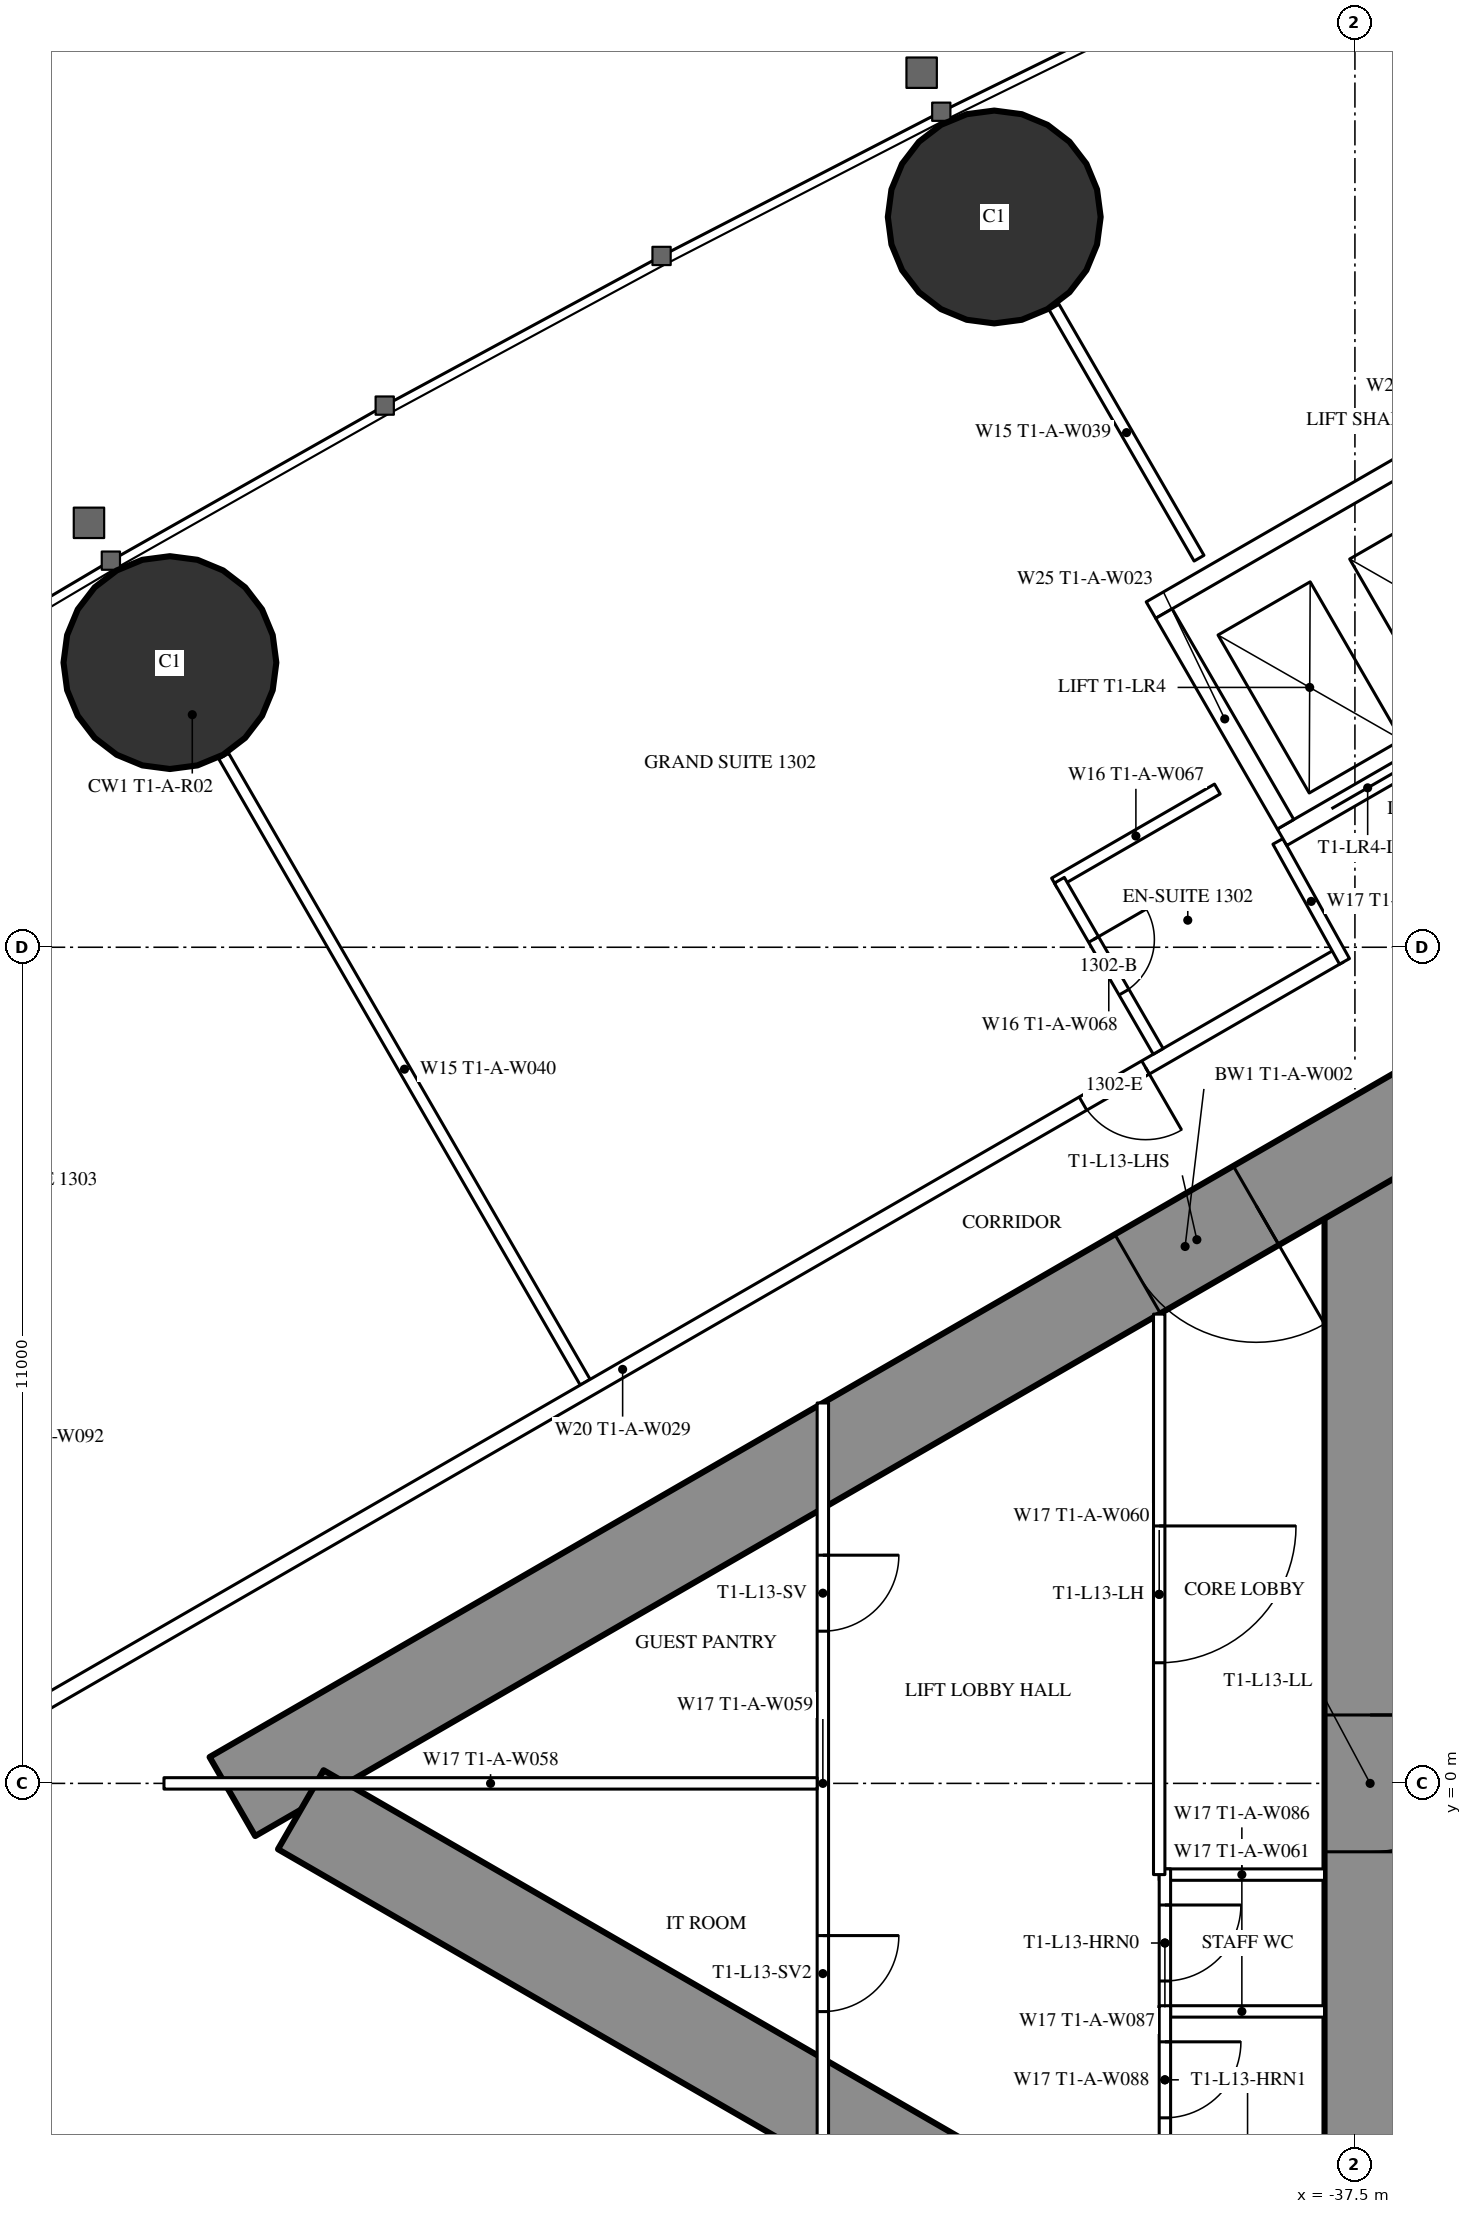
"""IFC4 building model, lengths in metres.
Left out: names, types, materials, properties, quantities, classifications, styles, units other than length and angle.
Written with IfcOpenShell. Run it as: python <this file> out.ifc"""

import sys

from ifc_helpers import new_model, si_unit, direction, frame, frame_2d, origin, origin_2d, place, context, subcontext, project, spatial, rectangle, hollow_circle, extrude, element, fill, save


model = new_model("IFC4")
c1 = context("Model", 3, precision=1e-05, world=origin(), true_north=direction((0.0, 1.0)))
c2 = subcontext(c1, "Body", "Model", "MODEL_VIEW")
j1 = project(units=[si_unit("LENGTHUNIT", "METRE"), si_unit("PLANEANGLEUNIT", "RADIAN")], contexts=[c1])
p1 = place(None, origin())
s1 = spatial("IfcSite", under=j1, at=p1, CompositionType="ELEMENT")
p2 = place(p1, origin())
s2 = spatial("IfcBuilding", under=s1, at=p2, CompositionType="ELEMENT")
p3 = place(p2, frame((0.0, 0.0, 53.0)))
s3 = spatial("IfcBuildingStorey", under=s2, at=p3, CompositionType="ELEMENT", Elevation=53.0)
for number, where, z_axis, x_axis in (
    (1, (-42.245, 20.607, 0.0), (0.0, 0.0, 1.0), (1.0, 0.0, 0.0)),
    (2, (-53.09, 14.745, 0.0), (0.0, 0.0, 1.0), (1.0, 0.0, 0.0)),
):
    element("IfcColumn", number, at=place(p3, frame(where, z_axis=z_axis, x_axis=x_axis)), inside=s3, PredefinedType="COLUMN", context=c2, shape_type="SweptSolid", body=[
        extrude(hollow_circle(Radius=1.4, WallThickness=0.12, at=origin_2d()), origin(), (0.0, 0.0, 1.0), 3.5),
    ])
p4 = place(p3, frame((-37.3, 8.6, 0.0), z_axis=(0.0, 0.0, 1.0), x_axis=(0.0, -1.0, 0.0)))
e3 = element("IfcWall", 3, at=p4, inside=s3, PredefinedType="SHEAR", context=c2, shape_type="SweptSolid", body=[
    extrude(rectangle(XDim=17.2, YDim=1.2, at=frame_2d((8.6, 0.0))), origin(), (0.0, 0.0, 1.0), 3.5),
])
p5 = place(p4, frame((7.7, 0.0, 0.0)))
e4 = element("IfcOpeningElement", 4, at=p5, cuts=e3, PredefinedType="OPENING", context=c2, shape_type="SweptSolid", body=[
    extrude(rectangle(XDim=1.8, YDim=2.2, at=frame_2d((0.9, 1.1))), frame((0.0, 0.61, 0.0), z_axis=(0.0, -1.0, 0.0), x_axis=(1.0, 0.0, 0.0)), (0.0, 0.0, 1.0), 1.22),
])
p6 = place(p3, frame((-27.2, 14.3, 0.0), z_axis=(0.0, 0.0, 1.0), x_axis=(-0.866026593062, -0.499997940104, 0.0)))
e5 = element("IfcWall", 5, at=p6, inside=s3, PredefinedType="SHEAR", context=c2, shape_type="SweptSolid", body=[
    extrude(rectangle(XDim=28.946, YDim=1.2, at=frame_2d((14.473, 0.0))), origin(), (0.0, 0.0, 1.0), 3.5),
])
p7 = place(p6, frame((4.6, 0.0, 0.0)))
e6 = element("IfcOpeningElement", 6, at=p7, cuts=e5, PredefinedType="OPENING", context=c2, shape_type="SweptSolid", body=[
    extrude(rectangle(XDim=1.0, YDim=2.2, at=frame_2d((0.5, 1.1))), frame((0.0, 0.61, 0.0), z_axis=(0.0, -1.0, 0.0), x_axis=(1.0, 0.0, 0.0)), (0.0, 0.0, 1.0), 1.22),
])
p8 = place(p6, frame((13.395, 0.0, 0.0)))
e7 = element("IfcOpeningElement", 7, at=p8, cuts=e5, PredefinedType="OPENING", context=c2, shape_type="SweptSolid", body=[
    extrude(rectangle(XDim=1.8, YDim=2.2, at=frame_2d((0.9, 1.1))), frame((0.0, 0.61, 0.0), z_axis=(0.0, -1.0, 0.0), x_axis=(1.0, 0.0, 0.0)), (0.0, 0.0, 1.0), 1.22),
])
p9 = place(p3, frame((-27.2, -14.3, 0.0), z_axis=(0.0, 0.0, 1.0), x_axis=(-0.866024021859, 0.500002393557, 0.0)))
e8 = element("IfcWall", 8, at=p9, inside=s3, PredefinedType="SHEAR", context=c2, shape_type="SweptSolid", body=[
    extrude(rectangle(XDim=27.907, YDim=1.2, at=frame_2d((13.954, 0.0))), origin(), (0.0, 0.0, 1.0), 3.5),
])
p10 = place(p9, frame((4.6, 0.0, 0.0)))
e9 = element("IfcOpeningElement", 9, at=p10, cuts=e8, PredefinedType="OPENING", context=c2, shape_type="SweptSolid", body=[
    extrude(rectangle(XDim=1.0, YDim=2.2, at=frame_2d((0.5, 1.1))), frame((0.0, 0.61, 0.0), z_axis=(0.0, -1.0, 0.0), x_axis=(1.0, 0.0, 0.0)), (0.0, 0.0, 1.0), 1.22),
])
p11 = place(p9, frame((13.395, 0.0, 0.0)))
e10 = element("IfcOpeningElement", 10, at=p11, cuts=e8, PredefinedType="OPENING", context=c2, shape_type="SweptSolid", body=[
    extrude(rectangle(XDim=1.8, YDim=2.2, at=frame_2d((0.9, 1.1))), frame((0.0, 0.61, 0.0), z_axis=(0.0, -1.0, 0.0), x_axis=(1.0, 0.0, 0.0)), (0.0, 0.0, 1.0), 1.22),
])
p12 = place(p3, frame((-47.627, 5.278, 0.0), z_axis=(0.0, 0.0, 1.0), x_axis=(-0.500009844318, 0.86601972009, 0.0)))
e11 = element("IfcWall", 11, at=p12, inside=s3, PredefinedType="PARTITIONING", context=c2, shape_type="SweptSolid", body=[
    extrude(rectangle(XDim=9.51, YDim=0.15, at=frame_2d((4.755, 0.0))), origin(), (0.0, 0.0, 1.0), 2.25),
])
p13 = place(p3, frame((-39.551, 16.119, 0.0), z_axis=(0.0, 0.0, 1.0), x_axis=(-0.500014214979, 0.866017196607, 0.0)))
e12 = element("IfcWall", 12, at=p13, inside=s3, PredefinedType="PARTITIONING", context=c2, shape_type="SweptSolid", body=[
    extrude(rectangle(XDim=3.815, YDim=0.15, at=frame_2d((1.907, 0.0))), origin(), (0.0, 0.0, 1.0), 3.25),
])
p14 = place(p3, frame((-37.7, 10.894, 0.0), z_axis=(0.0, 0.0, 1.0), x_axis=(-0.866027905338, -0.499995667157, 0.0)))
e13 = element("IfcWall", 13, at=p14, inside=s3, PredefinedType="PARTITIONING", context=c2, shape_type="SweptSolid", body=[
    extrude(rectangle(XDim=21.787, YDim=0.2, at=frame_2d((10.894, 0.0))), origin(), (0.0, 0.0, 1.0), 3.25),
])
p15 = place(p14, frame((20.237, 0.0, 0.0)))
e14 = element("IfcOpeningElement", 14, at=p15, cuts=e13, PredefinedType="OPENING", context=c2, shape_type="SweptSolid", body=[
    extrude(rectangle(XDim=0.95, YDim=2.2, at=frame_2d((0.475, 1.1))), frame((0.0, 0.11, 0.0), z_axis=(0.0, -1.0, 0.0), x_axis=(1.0, 0.0, 0.0)), (0.0, 0.0, 1.0), 0.22),
])
p16 = place(p14, frame((2.95, 0.0, 0.0)))
e15 = element("IfcOpeningElement", 15, at=p16, cuts=e13, PredefinedType="OPENING", context=c2, shape_type="SweptSolid", body=[
    extrude(rectangle(XDim=0.95, YDim=2.2, at=frame_2d((0.475, 1.1))), frame((0.0, 0.11, 0.0), z_axis=(0.0, -1.0, 0.0), x_axis=(1.0, 0.0, 0.0)), (0.0, 0.0, 1.0), 0.22),
])
p17 = place(p3, frame((-38.513, 12.392, 0.0), z_axis=(0.0, 0.0, 1.0), x_axis=(0.485585508183, -0.874189175317, 0.0)))
e16 = element("IfcWall", 16, at=p17, inside=s3, PredefinedType="PARTITIONING", context=c2, shape_type="SweptSolid", body=[
    extrude(rectangle(XDim=1.805, YDim=0.15, at=frame_2d((0.902, 0.0))), origin(), (0.0, 0.0, 1.0), 3.25),
])
p18 = place(p3, frame((-39.31, 13.082, 0.0), z_axis=(0.0, 0.0, 1.0), x_axis=(-0.866031185235, -0.4999899861, 0.0)))
e17 = element("IfcWall", 17, at=p18, inside=s3, PredefinedType="PARTITIONING", context=c2, shape_type="SweptSolid", body=[
    extrude(rectangle(XDim=2.475, YDim=0.15, at=frame_2d((1.238, 0.0))), origin(), (0.0, 0.0, 1.0), 3.25),
])
p19 = place(p3, frame((-40.088, 9.63, 0.0), z_axis=(0.0, 0.0, 1.0), x_axis=(-0.500006934395, 0.866021400173, 0.0)))
e18 = element("IfcWall", 18, at=p19, inside=s3, PredefinedType="PARTITIONING", context=c2, shape_type="SweptSolid", body=[
    extrude(rectangle(XDim=2.6, YDim=0.15, at=frame_2d((1.3, 0.0))), origin(), (0.0, 0.0, 1.0), 3.25),
])
p20 = place(p19, frame((0.9, 0.0, 0.0)))
e19 = element("IfcOpeningElement", 19, at=p20, cuts=e18, PredefinedType="OPENING", context=c2, shape_type="SweptSolid", body=[
    extrude(rectangle(XDim=0.8, YDim=2.2, at=frame_2d((0.4, 1.1))), frame((0.0, 0.085, 0.0), z_axis=(0.0, -1.0, 0.0), x_axis=(1.0, 0.0, 0.0)), (0.0, 0.0, 1.0), 0.17),
])
for number, where, z_axis, x_axis in (
    (20, (-37.9, -1.2, 0.0), (0.0, 0.0, 1.0), (-1.0, 0.0, 0.0)),
    (21, (-37.9, -3.0, 0.0), (0.0, 0.0, 1.0), (-1.0, 0.0, 0.0)),
):
    element("IfcWall", number, at=place(p3, frame(where, z_axis=z_axis, x_axis=x_axis)), inside=s3, PredefinedType="PARTITIONING", context=c2, shape_type="SweptSolid", body=[
        extrude(rectangle(XDim=2.175, YDim=0.15, at=frame_2d((1.087, 0.0))), origin(), (0.0, 0.0, 1.0), 3.25),
    ])
p21 = place(p3, frame((-40.0, -1.125, 0.0), z_axis=(0.0, 0.0, 1.0), x_axis=(0.0, -1.0, 0.0)))
e22 = element("IfcWall", 22, at=p21, inside=s3, PredefinedType="PARTITIONING", context=c2, shape_type="SweptSolid", body=[
    extrude(rectangle(XDim=1.95, YDim=0.15, at=frame_2d((0.975, 0.0))), origin(), (0.0, 0.0, 1.0), 3.25),
])
p22 = place(p21, frame((0.475, 0.0, 0.0)))
e23 = element("IfcOpeningElement", 23, at=p22, cuts=e22, PredefinedType="OPENING", context=c2, shape_type="SweptSolid", body=[
    extrude(rectangle(XDim=1.0, YDim=2.2, at=frame_2d((0.5, 1.1))), frame((0.0, 0.085, 0.0), z_axis=(0.0, -1.0, 0.0), x_axis=(1.0, 0.0, 0.0)), (0.0, 0.0, 1.0), 0.17),
])
p23 = place(p3, frame((-40.0, -2.925, 0.0), z_axis=(0.0, 0.0, 1.0), x_axis=(0.0, -1.0, 0.0)))
e24 = element("IfcWall", 24, at=p23, inside=s3, PredefinedType="PARTITIONING", context=c2, shape_type="SweptSolid", body=[
    extrude(rectangle(XDim=1.95, YDim=0.15, at=frame_2d((0.975, 0.0))), origin(), (0.0, 0.0, 1.0), 3.25),
])
p24 = place(p23, frame((0.475, 0.0, 0.0)))
e25 = element("IfcOpeningElement", 25, at=p24, cuts=e24, PredefinedType="OPENING", context=c2, shape_type="SweptSolid", body=[
    extrude(rectangle(XDim=1.0, YDim=2.2, at=frame_2d((0.5, 1.1))), frame((0.0, 0.085, 0.0), z_axis=(0.0, -1.0, 0.0), x_axis=(1.0, 0.0, 0.0)), (0.0, 0.0, 1.0), 0.17),
])
p25 = place(p3, frame((-40.075, 6.174, 0.0), z_axis=(0.0, 0.0, 1.0), x_axis=(0.0, -1.0, 0.0)))
e26 = element("IfcWall", 26, at=p25, inside=s3, PredefinedType="PARTITIONING", context=c2, shape_type="SweptSolid", body=[
    extrude(rectangle(XDim=7.374, YDim=0.15, at=frame_2d((3.687, 0.0))), origin(), (0.0, 0.0, 1.0), 3.25),
])
p26 = place(p25, frame((2.787, 0.0, 0.0)))
e27 = element("IfcOpeningElement", 27, at=p26, cuts=e26, PredefinedType="OPENING", context=c2, shape_type="SweptSolid", body=[
    extrude(rectangle(XDim=1.8, YDim=2.2, at=frame_2d((0.9, 1.1))), frame((0.0, 0.085, 0.0), z_axis=(0.0, -1.0, 0.0), x_axis=(1.0, 0.0, 0.0)), (0.0, 0.0, 1.0), 0.17),
])
p27 = place(p3, frame((-44.5, 5.005, 0.0), z_axis=(0.0, 0.0, 1.0), x_axis=(0.0, -1.0, 0.0)))
e28 = element("IfcWall", 28, at=p27, inside=s3, PredefinedType="PARTITIONING", context=c2, shape_type="SweptSolid", body=[
    extrude(rectangle(XDim=10.009, YDim=0.15, at=frame_2d((5.005, 0.0))), origin(), (0.0, 0.0, 1.0), 2.45),
])
p28 = place(p27, frame((2.002, 0.0, 0.0)))
e29 = element("IfcOpeningElement", 29, at=p28, cuts=e28, PredefinedType="OPENING", context=c2, shape_type="SweptSolid", body=[
    extrude(rectangle(XDim=1.0, YDim=2.2, at=frame_2d((0.5, 1.1))), frame((0.0, 0.085, 0.0), z_axis=(0.0, -1.0, 0.0), x_axis=(1.0, 0.0, 0.0)), (0.0, 0.0, 1.0), 0.17),
])
p29 = place(p27, frame((7.007, 0.0, 0.0)))
e30 = element("IfcOpeningElement", 30, at=p29, cuts=e28, PredefinedType="OPENING", context=c2, shape_type="SweptSolid", body=[
    extrude(rectangle(XDim=1.0, YDim=2.2, at=frame_2d((0.5, 1.1))), frame((0.0, 0.085, 0.0), z_axis=(0.0, -1.0, 0.0), x_axis=(1.0, 0.0, 0.0)), (0.0, 0.0, 1.0), 0.17),
])
p30 = place(p3, frame((-44.575, 0.0, 0.0), z_axis=(0.0, 0.0, 1.0), x_axis=(-1.0, 0.0, 0.0)))
e31 = element("IfcWall", 31, at=p30, inside=s3, PredefinedType="PARTITIONING", context=c2, shape_type="SweptSolid", body=[
    extrude(rectangle(XDim=8.593, YDim=0.15, at=frame_2d((4.297, 0.0))), origin(), (0.0, 0.0, 1.0), 2.25),
])
p31 = place(p3, frame((-31.01, 16.747, 0.0), z_axis=(0.0, 0.0, 1.0), x_axis=(-0.866028165386, -0.499995216735, 0.0)))
e32 = element("IfcWall", 32, at=p31, inside=s3, PredefinedType="PARTITIONING", context=c2, shape_type="SweptSolid", body=[
    extrude(rectangle(XDim=8.6, YDim=0.25, at=frame_2d((4.3, 0.0))), origin(), (0.0, 0.0, 1.0), 3.25),
])
p32 = place(p31, frame((0.75, 0.0, 0.0)))
e33 = element("IfcOpeningElement", 33, at=p32, cuts=e32, PredefinedType="OPENING", context=c2, shape_type="SweptSolid", body=[
    extrude(rectangle(XDim=1.1, YDim=2.2, at=frame_2d((0.55, 1.1))), frame((0.0, 0.135, 0.0), z_axis=(0.0, -1.0, 0.0), x_axis=(1.0, 0.0, 0.0)), (0.0, 0.0, 1.0), 0.27),
])
p33 = place(p31, frame((2.75, 0.0, 0.0)))
e34 = element("IfcOpeningElement", 34, at=p33, cuts=e32, PredefinedType="OPENING", context=c2, shape_type="SweptSolid", body=[
    extrude(rectangle(XDim=1.1, YDim=2.2, at=frame_2d((0.55, 1.1))), frame((0.0, 0.135, 0.0), z_axis=(0.0, -1.0, 0.0), x_axis=(1.0, 0.0, 0.0)), (0.0, 0.0, 1.0), 0.27),
])
p34 = place(p31, frame((4.75, 0.0, 0.0)))
e35 = element("IfcOpeningElement", 35, at=p34, cuts=e32, PredefinedType="OPENING", context=c2, shape_type="SweptSolid", body=[
    extrude(rectangle(XDim=1.1, YDim=2.2, at=frame_2d((0.55, 1.1))), frame((0.0, 0.135, 0.0), z_axis=(0.0, -1.0, 0.0), x_axis=(1.0, 0.0, 0.0)), (0.0, 0.0, 1.0), 0.27),
])
p35 = place(p31, frame((6.75, 0.0, 0.0)))
e36 = element("IfcOpeningElement", 36, at=p35, cuts=e32, PredefinedType="OPENING", context=c2, shape_type="SweptSolid", body=[
    extrude(rectangle(XDim=1.1, YDim=2.2, at=frame_2d((0.55, 1.1))), frame((0.0, 0.135, 0.0), z_axis=(0.0, -1.0, 0.0), x_axis=(1.0, 0.0, 0.0)), (0.0, 0.0, 1.0), 0.27),
])
p36 = place(p3, frame((-32.736, 19.736, 0.0), z_axis=(0.0, 0.0, 1.0), x_axis=(-0.866028165386, -0.499995216735, 0.0)))
e37 = element("IfcWall", 37, at=p36, inside=s3, PredefinedType="PARTITIONING", context=c2, shape_type="SweptSolid", body=[
    extrude(rectangle(XDim=8.6, YDim=0.25, at=frame_2d((4.3, 0.0))), origin(), (0.0, 0.0, 1.0), 3.25),
])
p37 = place(p3, frame((-38.413, 12.618, 0.0), z_axis=(0.0, 0.0, 1.0), x_axis=(-0.499872130319, 0.866099216793, 0.0)))
e38 = element("IfcWall", 38, at=p37, inside=s3, PredefinedType="PARTITIONING", context=c2, shape_type="SweptSolid", body=[
    extrude(rectangle(XDim=3.2, YDim=0.25, at=frame_2d((1.6, 0.0))), origin(), (0.0, 0.0, 1.0), 3.25),
])
p38 = place(p20, origin())
e39 = element("IfcDoor", 39, at=p38, inside=s3, OperationType="SINGLE_SWING_RIGHT", PredefinedType="DOOR", context=c2, shape_type="SweptSolid", body=[
    extrude(rectangle(XDim=0.8, YDim=2.2, at=frame_2d((0.4, 1.1))), frame((0.0, 0.025, 0.0), z_axis=(0.0, -1.0, 0.0), x_axis=(1.0, 0.0, 0.0)), (0.0, 0.0, 1.0), 0.05),
])
fill(e19, e39)
p39 = place(p16, origin())
e40 = element("IfcDoor", 40, at=p39, inside=s3, OperationType="SINGLE_SWING_LEFT", PredefinedType="DOOR", context=c2, shape_type="SweptSolid", body=[
    extrude(rectangle(XDim=0.95, YDim=2.2, at=frame_2d((0.475, 1.1))), frame((0.0, 0.025, 0.0), z_axis=(0.0, -1.0, 0.0), x_axis=(1.0, 0.0, 0.0)), (0.0, 0.0, 1.0), 0.05),
])
fill(e15, e40)
p40 = place(p22, origin())
e41 = element("IfcDoor", 41, at=p40, inside=s3, OperationType="SINGLE_SWING_LEFT", PredefinedType="DOOR", context=c2, shape_type="SweptSolid", body=[
    extrude(rectangle(XDim=1.0, YDim=2.2, at=frame_2d((0.5, 1.1))), frame((0.0, 0.025, 0.0), z_axis=(0.0, -1.0, 0.0), x_axis=(1.0, 0.0, 0.0)), (0.0, 0.0, 1.0), 0.05),
])
fill(e23, e41)
p41 = place(p24, origin())
e42 = element("IfcDoor", 42, at=p41, inside=s3, OperationType="SINGLE_SWING_LEFT", PredefinedType="DOOR", context=c2, shape_type="SweptSolid", body=[
    extrude(rectangle(XDim=1.0, YDim=2.2, at=frame_2d((0.5, 1.1))), frame((0.0, 0.025, 0.0), z_axis=(0.0, -1.0, 0.0), x_axis=(1.0, 0.0, 0.0)), (0.0, 0.0, 1.0), 0.05),
])
fill(e25, e42)
p42 = place(p26, origin())
e43 = element("IfcDoor", 43, at=p42, inside=s3, OperationType="DOUBLE_DOOR_SINGLE_SWING", PredefinedType="DOOR", context=c2, shape_type="SweptSolid", body=[
    extrude(rectangle(XDim=1.8, YDim=2.2, at=frame_2d((0.9, 1.1))), frame((0.0, 0.025, 0.0), z_axis=(0.0, -1.0, 0.0), x_axis=(1.0, 0.0, 0.0)), (0.0, 0.0, 1.0), 0.05),
])
fill(e27, e43)
p43 = place(p28, origin())
e44 = element("IfcDoor", 44, at=p43, inside=s3, OperationType="SINGLE_SWING_LEFT", PredefinedType="DOOR", context=c2, shape_type="SweptSolid", body=[
    extrude(rectangle(XDim=1.0, YDim=2.2, at=frame_2d((0.5, 1.1))), frame((0.0, 0.025, 0.0), z_axis=(0.0, -1.0, 0.0), x_axis=(1.0, 0.0, 0.0)), (0.0, 0.0, 1.0), 0.05),
])
fill(e29, e44)
p44 = place(p29, origin())
e45 = element("IfcDoor", 45, at=p44, inside=s3, OperationType="SINGLE_SWING_LEFT", PredefinedType="DOOR", context=c2, shape_type="SweptSolid", body=[
    extrude(rectangle(XDim=1.0, YDim=2.2, at=frame_2d((0.5, 1.1))), frame((0.0, 0.025, 0.0), z_axis=(0.0, -1.0, 0.0), x_axis=(1.0, 0.0, 0.0)), (0.0, 0.0, 1.0), 0.05),
])
fill(e30, e45)
p45 = place(p8, origin())
e46 = element("IfcDoor", 46, at=p45, inside=s3, OperationType="DOUBLE_DOOR_SINGLE_SWING", PredefinedType="DOOR", context=c2, shape_type="SweptSolid", body=[
    extrude(rectangle(XDim=1.8, YDim=2.2, at=frame_2d((0.9, 1.1))), frame((0.0, 0.025, 0.0), z_axis=(0.0, -1.0, 0.0), x_axis=(1.0, 0.0, 0.0)), (0.0, 0.0, 1.0), 0.05),
])
fill(e7, e46)
p46 = place(p5, origin())
e47 = element("IfcDoor", 47, at=p46, inside=s3, OperationType="DOUBLE_DOOR_SINGLE_SWING", PredefinedType="DOOR", context=c2, shape_type="SweptSolid", body=[
    extrude(rectangle(XDim=1.8, YDim=2.2, at=frame_2d((0.9, 1.1))), frame((0.0, 0.025, 0.0), z_axis=(0.0, -1.0, 0.0), x_axis=(1.0, 0.0, 0.0)), (0.0, 0.0, 1.0), 0.05),
])
fill(e4, e47)
p47 = place(p35, origin())
e48 = element("IfcDoor", 48, at=p47, inside=s3, OperationType="DOUBLE_DOOR_SLIDING", PredefinedType="USERDEFINED", context=c2, shape_type="SweptSolid", body=[
    extrude(rectangle(XDim=1.1, YDim=2.2, at=frame_2d((0.55, 1.1))), frame((0.0, 0.025, 0.0), z_axis=(0.0, -1.0, 0.0), x_axis=(1.0, 0.0, 0.0)), (0.0, 0.0, 1.0), 0.05),
])
fill(e36, e48)
save(model, sys.argv[1])
